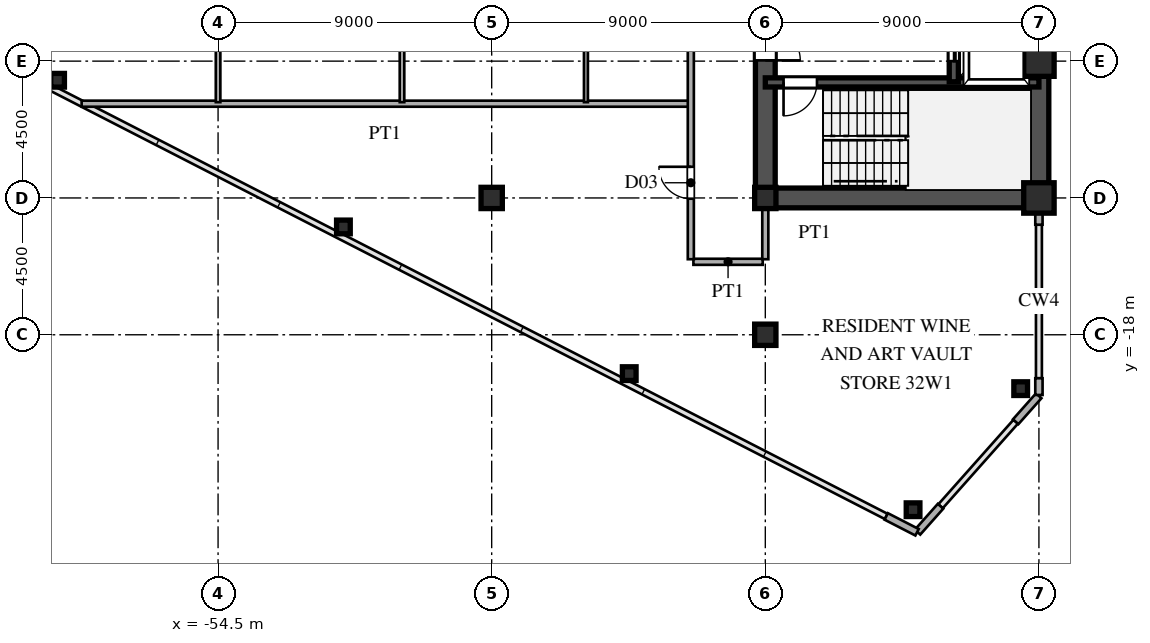
"""IFC4 building model, lengths in metres.
Left out: names, types, materials, properties, quantities, classifications, styles, units other than length and angle.
Written with IfcOpenShell. Run it as: python <this file> out.ifc"""

import sys

from ifc_helpers import new_model, si_unit, direction, frame, frame_2d, origin, origin_2d, place, context, subcontext, project, spatial, rectangle, hollow_rectangle, i_section, extrude, source, transform, mapped, element, fill, save


model = new_model("IFC4")
c1 = context("Model", 3, precision=1e-05, world=origin(), true_north=direction((0.0, 1.0)))
c2 = subcontext(c1, "Body", "Model", "MODEL_VIEW")
j1 = project(units=[si_unit("LENGTHUNIT", "METRE"), si_unit("PLANEANGLEUNIT", "RADIAN")], contexts=[c1])
p1 = place(None, origin())
s1 = spatial("IfcSite", under=j1, at=p1, CompositionType="ELEMENT")
p2 = place(p1, origin())
s2 = spatial("IfcBuilding", under=s1, at=p2, CompositionType="ELEMENT")
p3 = place(p2, frame((0.0, 0.0, 121.2)))
s3 = spatial("IfcBuildingStorey", under=s2, at=p3, CompositionType="ELEMENT", Elevation=121.2)
m1 = source(origin(), c2, "Body", "SweptSolid", [
    extrude(hollow_rectangle(XDim=1.0, YDim=1.0, WallThickness=0.042, at=origin_2d()), origin(), (0.0, 0.0, 1.0), 3.6),
])
for number, where, z_axis, x_axis in (
    (1, (-27.5, -13.5, 0.0), (0.0, 0.0, 1.0), (1.0, 0.0, 0.0)),
    (2, (-27.5, -9.0, 0.0), (0.0, 0.0, 1.0), (1.0, 0.0, 0.0)),
):
    element("IfcColumn", number, at=place(p3, frame(where, z_axis=z_axis, x_axis=x_axis)), inside=s3, PredefinedType="COLUMN", context=c2, shape_type="MappedRepresentation", body=[
        mapped(m1, transform((0.0, 0.0, 0.0), scale=1.0)),
    ])
m2 = source(origin(), c2, "Body", "SweptSolid", [
    extrude(i_section(OverallWidth=0.7, OverallDepth=0.7, WebThickness=0.028, FlangeThickness=0.045, at=origin_2d()), origin(), (0.0, 0.0, 1.0), 3.6),
])
for number, where, z_axis, x_axis in (
    (3, (-36.5, -18.0, 0.0), (0.0, 0.0, 1.0), (1.0, 0.0, 0.0)),
    (4, (-36.5, -13.5, 0.0), (0.0, 0.0, 1.0), (1.0, 0.0, 0.0)),
    (5, (-45.5, -13.5, 0.0), (0.0, 0.0, 1.0), (1.0, 0.0, 0.0)),
):
    element("IfcColumn", number, at=place(p3, frame(where, z_axis=z_axis, x_axis=x_axis)), inside=s3, PredefinedType="COLUMN", context=c2, shape_type="MappedRepresentation", body=[
        mapped(m2, transform((0.0, 0.0, 0.0), scale=1.0)),
    ])
m3 = source(origin(), c2, "Body", "SweptSolid", [
    extrude(hollow_rectangle(XDim=0.45, YDim=0.45, WallThickness=0.018, at=origin_2d()), origin(), (0.0, 0.0, 1.0), 3.6),
])
for number, where, z_axis, x_axis in (
    (6, (-28.1, -19.772, 0.0), (0.0, 0.0, 1.0), (1.0, 0.0, 0.0)),
    (7, (-31.64, -23.754, 0.0), (0.0, 0.0, 1.0), (1.0, 0.0, 0.0)),
    (8, (-40.976, -19.278, 0.0), (0.0, 0.0, 1.0), (1.0, 0.0, 0.0)),
    (9, (-50.377, -14.453, 0.0), (0.0, 0.0, 1.0), (1.0, 0.0, 0.0)),
    (10, (-59.779, -9.629, 0.0), (0.0, 0.0, 1.0), (1.0, 0.0, 0.0)),
):
    element("IfcColumn", number, at=place(p3, frame(where, z_axis=z_axis, x_axis=x_axis)), inside=s3, PredefinedType="COLUMN", context=c2, shape_type="MappedRepresentation", body=[
        mapped(m3, transform((0.0, 0.0, 0.0), scale=1.0)),
    ])
p4 = place(p3, frame((-27.5, -19.98, 0.0), z_axis=(0.0, 0.0, 1.0), x_axis=(0.0, 1.0, 0.0)))
e11 = element("IfcWall", 11, at=p4, inside=s3, PredefinedType="SOLIDWALL", context=c2, shape_type="SweptSolid", body=[
    extrude(rectangle(XDim=0.55, YDim=0.24, at=frame_2d((0.275, 0.0))), origin(), (0.0, 0.0, 1.0), 3.38),
])
p5 = place(p3, frame((-27.5, -14.38, 0.0), z_axis=(0.0, 0.0, 1.0), x_axis=(0.0, 1.0, 0.0)))
e12 = element("IfcWall", 12, at=p5, inside=s3, PredefinedType="SOLIDWALL", context=c2, shape_type="SweptSolid", body=[
    extrude(rectangle(XDim=0.55, YDim=0.24, at=frame_2d((0.275, 0.0))), origin(), (0.0, 0.0, 1.0), 2.88),
])
p6 = place(p3, frame((-32.523, -23.975, 0.0), z_axis=(0.0, 0.0, 1.0), x_axis=(0.889797395748, -0.456355776255, 0.0)))
e13 = element("IfcWall", 13, at=p6, inside=s3, PredefinedType="SOLIDWALL", context=c2, shape_type="SweptSolid", body=[
    extrude(rectangle(XDim=1.14, YDim=0.24, at=frame_2d((0.57, 0.0))), origin(), (0.0, 0.0, 1.0), 3.38),
])
for number, where, z_axis, x_axis in (
    (14, (-31.493, -24.492, 0.0), (0.0, 0.0, 1.0), (0.664, 0.747, 0.0)),
    (15, (-28.264, -20.86, 0.0), (0.0, 0.0, 1.0), (0.664, 0.747, 0.0)),
):
    element("IfcWall", number, at=place(p3, frame(where, z_axis=z_axis, x_axis=x_axis)), inside=s3, PredefinedType="SOLIDWALL", context=c2, shape_type="SweptSolid", body=[
        extrude(rectangle(XDim=1.14, YDim=0.24, at=frame_2d((0.57, 0.0))), origin(), (0.0, 0.0, 1.0), 3.38),
    ])
p7 = place(p3, frame((-27.5, -13.5, 0.0), z_axis=(0.0, 0.0, 1.0), x_axis=(0.0, 1.0, 0.0)))
e16 = element("IfcWall", 16, at=p7, inside=s3, PredefinedType="SHEAR", context=c2, shape_type="SweptSolid", body=[
    extrude(rectangle(XDim=12.2, YDim=0.65, at=frame_2d((6.1, 0.0))), origin(), (0.0, 0.0, 1.0), 3.38),
])
p8 = place(p3, frame((-36.5, -13.5, 0.0), z_axis=(0.0, 0.0, 1.0), x_axis=(1.0, 0.0, 0.0)))
e17 = element("IfcWall", 17, at=p8, inside=s3, PredefinedType="SHEAR", context=c2, shape_type="SweptSolid", body=[
    extrude(rectangle(XDim=9.0, YDim=0.65, at=frame_2d((4.5, 0.0))), origin(), (0.0, 0.0, 1.0), 3.38),
])
p9 = place(p3, frame((-36.5, -13.65, 0.0), z_axis=(0.0, 0.0, 1.0), x_axis=(0.0, 1.0, 0.0)))
e18 = element("IfcWall", 18, at=p9, inside=s3, PredefinedType="SHEAR", context=c2, shape_type="SweptSolid", body=[
    extrude(rectangle(XDim=7.15, YDim=0.65, at=frame_2d((3.575, 0.0))), origin(), (0.0, 0.0, 1.0), 3.38),
])
p10 = place(p9, frame((4.675, 0.0, 0.0)))
e19 = element("IfcOpeningElement", 19, at=p10, cuts=e18, PredefinedType="OPENING", context=c2, shape_type="SweptSolid", body=[
    extrude(rectangle(XDim=1.15, YDim=2.2, at=frame_2d((0.575, 1.1))), frame((0.0, 0.335, 0.0), z_axis=(0.0, -1.0, 0.0), x_axis=(1.0, 0.0, 0.0)), (0.0, 0.0, 1.0), 0.67),
])
p11 = place(p3, frame((-36.5, -9.7, 0.0), z_axis=(0.0, 0.0, 1.0), x_axis=(1.0, 0.0, 0.0)))
e20 = element("IfcWall", 20, at=p11, inside=s3, PredefinedType="SHEAR", context=c2, shape_type="SweptSolid", body=[
    extrude(rectangle(XDim=9.0, YDim=0.3, at=frame_2d((4.5, 0.0))), origin(), (0.0, 0.0, 1.0), 3.38),
])
p12 = place(p11, frame((0.6, 0.0, 0.0)))
e21 = element("IfcOpeningElement", 21, at=p12, cuts=e20, PredefinedType="OPENING", context=c2, shape_type="SweptSolid", body=[
    extrude(rectangle(XDim=1.1, YDim=2.2, at=frame_2d((0.55, 1.1))), frame((0.0, 0.16, 0.0), z_axis=(0.0, -1.0, 0.0), x_axis=(1.0, 0.0, 0.0)), (0.0, 0.0, 1.0), 0.32),
])
p13 = place(p3, frame((-30.3, -9.68, 0.0), z_axis=(0.0, 0.0, 1.0), x_axis=(0.0, 1.0, 0.0)))
e22 = element("IfcWall", 22, at=p13, inside=s3, PredefinedType="SHEAR", context=c2, shape_type="SweptSolid", body=[
    extrude(rectangle(XDim=2.56, YDim=0.3, at=frame_2d((1.28, 0.0))), origin(), (0.0, 0.0, 1.0), 3.38),
])
p14 = place(p13, frame((0.68, 0.0, 0.0)))
e23 = element("IfcOpeningElement", 23, at=p14, cuts=e22, PredefinedType="OPENING", context=c2, shape_type="SweptSolid", body=[
    extrude(rectangle(XDim=1.2, YDim=2.25, at=frame_2d((0.6, 1.125))), frame((0.0, 0.16, 0.0), z_axis=(0.0, -1.0, 0.0), x_axis=(1.0, 0.0, 0.0)), (0.0, 0.0, 1.0), 0.32),
])
p15 = place(p3, frame((-38.865, -15.6, 0.0), z_axis=(0.0, 0.0, 1.0), x_axis=(1.0, 0.0, 0.0)))
e24 = element("IfcWall", 24, at=p15, inside=s3, PredefinedType="PARTITIONING", context=c2, shape_type="SweptSolid", body=[
    extrude(rectangle(XDim=2.28, YDim=0.2, at=frame_2d((1.14, 0.0))), origin(), (0.0, 0.0, 1.0), 3.38),
])
p16 = place(p3, frame((-58.988, -10.4, 0.0), z_axis=(0.0, 0.0, 1.0), x_axis=(1.0, 0.0, 0.0)))
e25 = element("IfcWall", 25, at=p16, inside=s3, PredefinedType="PARTITIONING", context=c2, shape_type="SweptSolid", body=[
    extrude(rectangle(XDim=19.958, YDim=0.2, at=frame_2d((9.979, 0.0))), origin(), (0.0, 0.0, 1.0), 3.38),
])
p17 = place(p3, frame((-54.5, -10.35, 0.0), z_axis=(0.0, 0.0, 1.0), x_axis=(0.0, 1.0, 0.0)))
e26 = element("IfcWall", 26, at=p17, inside=s3, PredefinedType="PARTITIONING", context=c2, shape_type="SweptSolid", body=[
    extrude(rectangle(XDim=23.082, YDim=0.15, at=frame_2d((11.541, 0.0))), origin(), (0.0, 0.0, 1.0), 2.78),
])
p18 = place(p17, frame((6.475, 0.0, 0.0)))
e27 = element("IfcOpeningElement", 27, at=p18, cuts=e26, PredefinedType="OPENING", context=c2, shape_type="SweptSolid", body=[
    extrude(rectangle(XDim=0.95, YDim=2.15, at=frame_2d((0.475, 1.075))), frame((0.0, 0.085, 0.0), z_axis=(0.0, -1.0, 0.0), x_axis=(1.0, 0.0, 0.0)), (0.0, 0.0, 1.0), 0.17),
])
p19 = place(p17, frame((11.142, 0.0, 0.0)))
e28 = element("IfcOpeningElement", 28, at=p19, cuts=e26, PredefinedType="OPENING", context=c2, shape_type="SweptSolid", body=[
    extrude(rectangle(XDim=0.95, YDim=2.15, at=frame_2d((0.475, 1.075))), frame((0.0, 0.085, 0.0), z_axis=(0.0, -1.0, 0.0), x_axis=(1.0, 0.0, 0.0)), (0.0, 0.0, 1.0), 0.17),
])
p20 = place(p17, frame((20.575, 0.0, 0.0)))
e29 = element("IfcOpeningElement", 29, at=p20, cuts=e26, PredefinedType="OPENING", context=c2, shape_type="SweptSolid", body=[
    extrude(rectangle(XDim=0.95, YDim=2.15, at=frame_2d((0.475, 1.075))), frame((0.0, 0.085, 0.0), z_axis=(0.0, -1.0, 0.0), x_axis=(1.0, 0.0, 0.0)), (0.0, 0.0, 1.0), 0.17),
])
p21 = place(p17, frame((16.026, 0.0, 0.0)))
e30 = element("IfcOpeningElement", 30, at=p21, cuts=e26, PredefinedType="OPENING", context=c2, shape_type="SweptSolid", body=[
    extrude(rectangle(XDim=0.95, YDim=2.15, at=frame_2d((0.475, 1.075))), frame((0.0, 0.085, 0.0), z_axis=(0.0, -1.0, 0.0), x_axis=(1.0, 0.0, 0.0)), (0.0, 0.0, 1.0), 0.17),
])
p22 = place(p3, frame((-48.45, -10.35, 0.0), z_axis=(0.0, 0.0, 1.0), x_axis=(0.0, 1.0, 0.0)))
e31 = element("IfcWall", 31, at=p22, inside=s3, PredefinedType="PARTITIONING", context=c2, shape_type="SweptSolid", body=[
    extrude(rectangle(XDim=24.104, YDim=0.15, at=frame_2d((12.052, 0.0))), origin(), (0.0, 0.0, 1.0), 3.38),
])
p23 = place(p22, frame((6.475, 0.0, 0.0)))
e32 = element("IfcOpeningElement", 32, at=p23, cuts=e31, PredefinedType="OPENING", context=c2, shape_type="SweptSolid", body=[
    extrude(rectangle(XDim=0.95, YDim=2.15, at=frame_2d((0.475, 1.075))), frame((0.0, 0.085, 0.0), z_axis=(0.0, -1.0, 0.0), x_axis=(1.0, 0.0, 0.0)), (0.0, 0.0, 1.0), 0.17),
])
p24 = place(p22, frame((1.808, 0.0, 0.0)))
e33 = element("IfcOpeningElement", 33, at=p24, cuts=e31, PredefinedType="OPENING", context=c2, shape_type="SweptSolid", body=[
    extrude(rectangle(XDim=0.95, YDim=2.15, at=frame_2d((0.475, 1.075))), frame((0.0, 0.085, 0.0), z_axis=(0.0, -1.0, 0.0), x_axis=(1.0, 0.0, 0.0)), (0.0, 0.0, 1.0), 0.17),
])
p25 = place(p22, frame((21.128, 0.0, 0.0)))
e34 = element("IfcOpeningElement", 34, at=p25, cuts=e31, PredefinedType="OPENING", context=c2, shape_type="SweptSolid", body=[
    extrude(rectangle(XDim=0.95, YDim=2.15, at=frame_2d((0.475, 1.075))), frame((0.0, 0.085, 0.0), z_axis=(0.0, -1.0, 0.0), x_axis=(1.0, 0.0, 0.0)), (0.0, 0.0, 1.0), 0.17),
])
p26 = place(p22, frame((16.026, 0.0, 0.0)))
e35 = element("IfcOpeningElement", 35, at=p26, cuts=e31, PredefinedType="OPENING", context=c2, shape_type="SweptSolid", body=[
    extrude(rectangle(XDim=0.95, YDim=2.15, at=frame_2d((0.475, 1.075))), frame((0.0, 0.085, 0.0), z_axis=(0.0, -1.0, 0.0), x_axis=(1.0, 0.0, 0.0)), (0.0, 0.0, 1.0), 0.17),
])
p27 = place(p3, frame((-42.4, -10.35, 0.0), z_axis=(0.0, 0.0, 1.0), x_axis=(0.0, 1.0, 0.0)))
e36 = element("IfcWall", 36, at=p27, inside=s3, PredefinedType="PARTITIONING", context=c2, shape_type="SweptSolid", body=[
    extrude(rectangle(XDim=9.233, YDim=0.13, at=frame_2d((4.617, 0.0))), origin(), (0.0, 0.0, 1.0), 3.38),
])
p28 = place(p27, frame((6.475, 0.0, 0.0)))
e37 = element("IfcOpeningElement", 37, at=p28, cuts=e36, PredefinedType="OPENING", context=c2, shape_type="SweptSolid", body=[
    extrude(rectangle(XDim=0.95, YDim=2.15, at=frame_2d((0.475, 1.075))), frame((0.0, 0.075, 0.0), z_axis=(0.0, -1.0, 0.0), x_axis=(1.0, 0.0, 0.0)), (0.0, 0.0, 1.0), 0.15),
])
p29 = place(p3, frame((-38.95, -15.515, 0.0), z_axis=(0.0, 0.0, 1.0), x_axis=(0.0, 1.0, 0.0)))
e38 = element("IfcWall", 38, at=p29, inside=s3, PredefinedType="PARTITIONING", context=c2, shape_type="SweptSolid", body=[
    extrude(rectangle(XDim=31.03, YDim=0.2, at=frame_2d((15.515, 0.0))), origin(), (0.0, 0.0, 1.0), 3.38),
])
p30 = place(p29, frame((1.99, 0.0, 0.0)))
e39 = element("IfcOpeningElement", 39, at=p30, cuts=e38, PredefinedType="OPENING", context=c2, shape_type="SweptSolid", body=[
    extrude(rectangle(XDim=1.05, YDim=2.25, at=frame_2d((0.525, 1.125))), frame((0.0, 0.11, 0.0), z_axis=(0.0, -1.0, 0.0), x_axis=(1.0, 0.0, 0.0)), (0.0, 0.0, 1.0), 0.22),
])
p31 = place(p29, frame((11.38, 0.0, 0.0)))
e40 = element("IfcOpeningElement", 40, at=p31, cuts=e38, PredefinedType="OPENING", context=c2, shape_type="SweptSolid", body=[
    extrude(rectangle(XDim=1.05, YDim=2.25, at=frame_2d((0.525, 1.125))), frame((0.0, 0.11, 0.0), z_axis=(0.0, -1.0, 0.0), x_axis=(1.0, 0.0, 0.0)), (0.0, 0.0, 1.0), 0.22),
])
p32 = place(p29, frame((24.617, 0.0, 0.0)))
e41 = element("IfcOpeningElement", 41, at=p32, cuts=e38, PredefinedType="OPENING", context=c2, shape_type="SweptSolid", body=[
    extrude(rectangle(XDim=1.05, YDim=2.25, at=frame_2d((0.525, 1.125))), frame((0.0, 0.11, 0.0), z_axis=(0.0, -1.0, 0.0), x_axis=(1.0, 0.0, 0.0)), (0.0, 0.0, 1.0), 0.22),
])
p33 = place(p3, frame((-36.5, -15.515, 0.0), z_axis=(0.0, 0.0, 1.0), x_axis=(0.0, 1.0, 0.0)))
e42 = element("IfcWall", 42, at=p33, inside=s3, PredefinedType="PARTITIONING", context=c2, shape_type="SweptSolid", body=[
    extrude(rectangle(XDim=1.685, YDim=0.2, at=frame_2d((0.842, 0.0))), origin(), (0.0, 0.0, 1.0), 2.78),
])
m4 = source(origin(), c2, "Body", "SweptSolid", [
    extrude(rectangle(XDim=1.15, YDim=2.2, at=frame_2d((0.575, 1.1))), frame((0.0, 0.025, 0.0), z_axis=(0.0, -1.0, 0.0), x_axis=(1.0, 0.0, 0.0)), (0.0, 0.0, 1.0), 0.05),
])
p34 = place(p10, frame((1.15, 0.0, 0.0), z_axis=(0.0, 0.0, 1.0), x_axis=(-1.0, 0.0, 0.0)))
e43 = element("IfcDoor", 43, at=p34, inside=s3, OperationType="SINGLE_SWING_LEFT", PredefinedType="DOOR", context=c2, shape_type="MappedRepresentation", body=[
    mapped(m4, transform((0.0, 0.0, 0.0), scale=1.0)),
])
fill(e19, e43)
m5 = source(origin(), c2, "Body", "SweptSolid", [
    extrude(rectangle(XDim=1.1, YDim=2.2, at=frame_2d((0.55, 1.1))), frame((0.0, 0.025, 0.0), z_axis=(0.0, -1.0, 0.0), x_axis=(1.0, 0.0, 0.0)), (0.0, 0.0, 1.0), 0.05),
])
p35 = place(p12, frame((1.1, 0.0, 0.0), z_axis=(0.0, 0.0, 1.0), x_axis=(-1.0, 0.0, 0.0)))
e44 = element("IfcDoor", 44, at=p35, inside=s3, OperationType="SINGLE_SWING_LEFT", PredefinedType="DOOR", context=c2, shape_type="MappedRepresentation", body=[
    mapped(m5, transform((0.0, 0.0, 0.0), scale=1.0)),
])
fill(e21, e44)
m6 = source(origin(), c2, "Body", "SweptSolid", [
    extrude(rectangle(XDim=1.2, YDim=2.25, at=frame_2d((0.6, 1.125))), frame((0.0, 0.025, 0.0), z_axis=(0.0, -1.0, 0.0), x_axis=(1.0, 0.0, 0.0)), (0.0, 0.0, 1.0), 0.05),
])
p36 = place(p14, origin())
e45 = element("IfcDoor", 45, at=p36, inside=s3, OperationType="DOUBLE_DOOR_SLIDING", PredefinedType="DOOR", context=c2, shape_type="MappedRepresentation", body=[
    mapped(m6, transform((0.0, 0.0, 0.0), scale=1.0)),
])
fill(e23, e45)
m7 = source(origin(), c2, "Body", "SweptSolid", [
    extrude(rectangle(XDim=1.05, YDim=2.25, at=frame_2d((0.525, 1.125))), frame((0.0, 0.025, 0.0), z_axis=(0.0, -1.0, 0.0), x_axis=(1.0, 0.0, 0.0)), (0.0, 0.0, 1.0), 0.05),
])
p37 = place(p30, origin())
e46 = element("IfcDoor", 46, at=p37, inside=s3, OperationType="SINGLE_SWING_RIGHT", PredefinedType="DOOR", context=c2, shape_type="MappedRepresentation", body=[
    mapped(m7, transform((0.0, 0.0, 0.0), scale=1.0)),
])
fill(e39, e46)
save(model, sys.argv[1])
